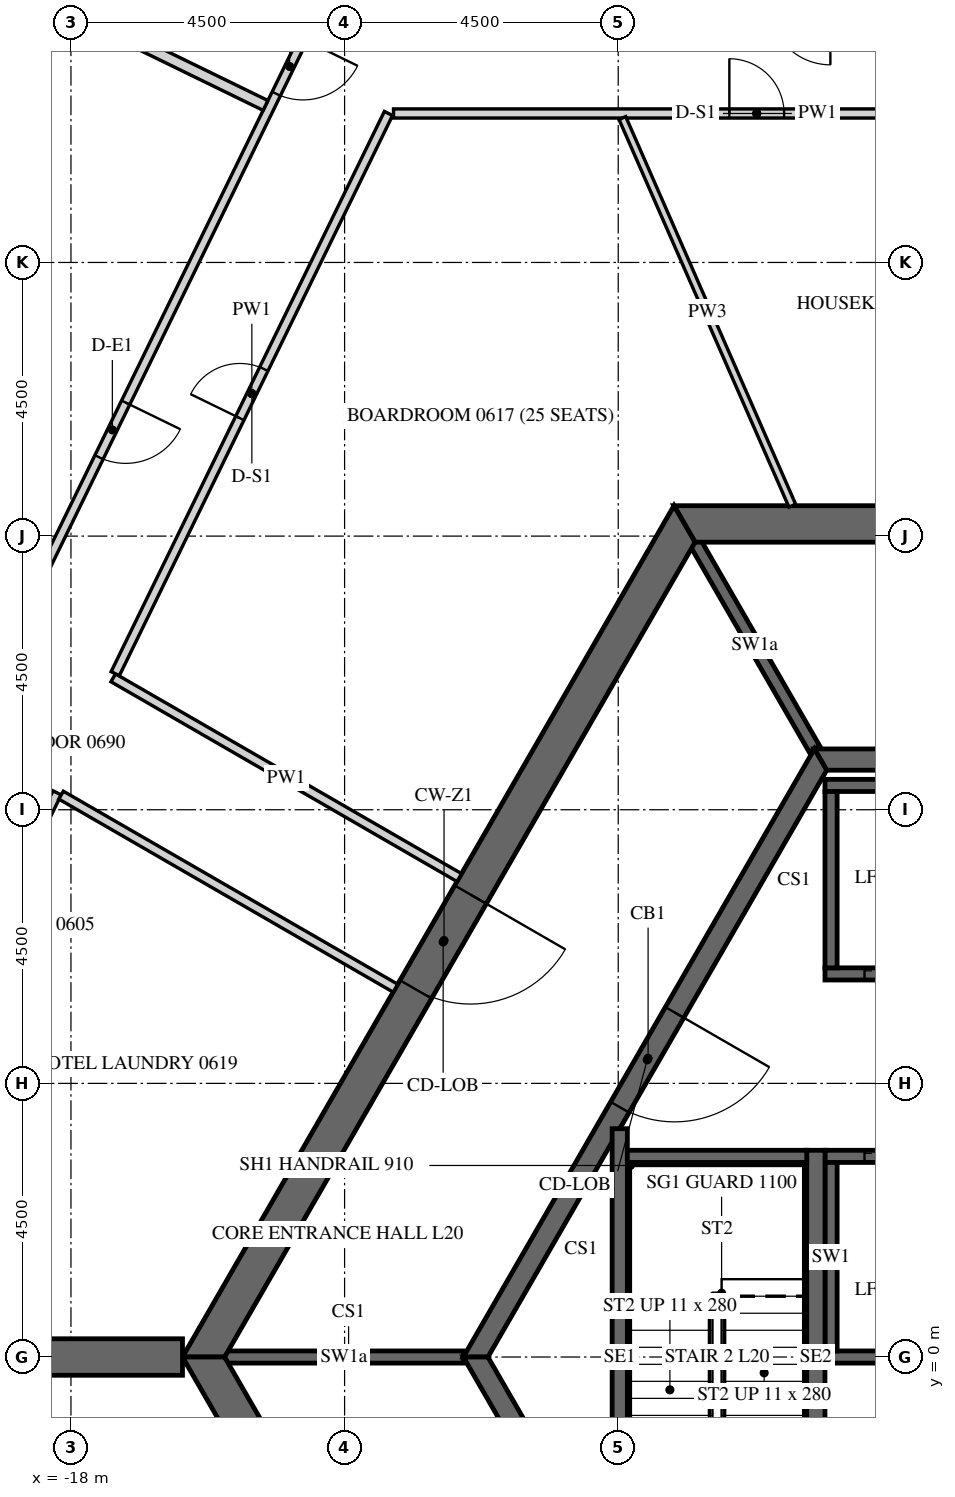
"""IFC4 building model, lengths in metres.
Left out: names, types, materials, properties, quantities, classifications, styles, units other than length and angle.
Written with IfcOpenShell. Run it as: python <this file> out.ifc"""

import sys

from ifc_helpers import new_model, si_unit, direction, frame, frame_2d, origin, place, context, subcontext, project, spatial, polyline, rectangle, outline, extrude, element, fill, save


model = new_model("IFC4")
c1 = context("Model", 3, precision=1e-05, world=origin(), true_north=direction((0.0, 1.0)))
c2 = subcontext(c1, "Body", "Model", "MODEL_VIEW")
j1 = project(units=[si_unit("LENGTHUNIT", "METRE"), si_unit("PLANEANGLEUNIT", "RADIAN")], contexts=[c1])
p1 = place(None, origin())
s1 = spatial("IfcSite", under=j1, at=p1, CompositionType="ELEMENT")
p2 = place(p1, origin())
s2 = spatial("IfcBuilding", under=s1, at=p2, CompositionType="ELEMENT")
p3 = place(p2, frame((0.0, 0.0, 92.1)))
s3 = spatial("IfcBuildingStorey", under=s2, at=p3, CompositionType="ELEMENT", Elevation=92.1)
p4 = place(p3, frame((-7.91, 13.7, -0.15), z_axis=(0.0, 0.0, 1.0), x_axis=(-0.499999880136, -0.866025472988, 0.0)))
e1 = element("IfcWall", 1, at=p4, inside=s3, PredefinedType="SHEAR", context=c2, shape_type="SweptSolid", body=[
    extrude(outline(polyline([(-0.173, -0.3), (15.993, -0.3), (15.646, 0.3), (0.173, 0.3), (-0.173, -0.3)])), origin(), (0.0, 0.0, 1.0), 3.9),
])
p5 = place(p4, frame((7.039, 0.0, 0.15)))
e2 = element("IfcOpeningElement", 2, at=p5, cuts=e1, PredefinedType="OPENING", context=c2, shape_type="SweptSolid", body=[
    extrude(rectangle(XDim=1.8, YDim=2.4, at=frame_2d((0.9, 1.2))), frame((0.0, 0.31, 0.0), z_axis=(0.0, -1.0, 0.0), x_axis=(1.0, 0.0, 0.0)), (0.0, 0.0, 1.0), 0.62),
])
p6 = place(p3, frame((-15.819, 0.0, -0.15), z_axis=(0.0, 0.0, 1.0), x_axis=(0.499999880136, -0.866025472988, 0.0)))
e3 = element("IfcWall", 3, at=p6, inside=s3, PredefinedType="SHEAR", context=c2, shape_type="SweptSolid", body=[
    extrude(outline(polyline([(-0.173, -0.3), (15.993, -0.3), (15.646, 0.3), (0.173, 0.3), (-0.173, -0.3)])), origin(), (0.0, 0.0, 1.0), 3.9),
])
p7 = place(p6, frame((6.981, 0.0, 0.15)))
e4 = element("IfcOpeningElement", 4, at=p7, cuts=e3, PredefinedType="OPENING", context=c2, shape_type="SweptSolid", body=[
    extrude(rectangle(XDim=1.8, YDim=2.4, at=frame_2d((0.9, 1.2))), frame((0.0, 0.31, 0.0), z_axis=(0.0, -1.0, 0.0), x_axis=(1.0, 0.0, 0.0)), (0.0, 0.0, 1.0), 0.62),
])
p8 = place(p3, frame((7.91, 13.7, -0.15), z_axis=(0.0, 0.0, 1.0), x_axis=(-1.0, 0.0, 0.0)))
e5 = element("IfcWall", 5, at=p8, inside=s3, PredefinedType="SHEAR", context=c2, shape_type="SweptSolid", body=[
    extrude(outline(polyline([(-0.173, -0.3), (15.993, -0.3), (15.646, 0.3), (0.173, 0.3), (-0.173, -0.3)])), origin(), (0.0, 0.0, 1.0), 3.9),
])
p9 = place(p8, frame((7.31, 0.0, 0.15)))
e6 = element("IfcOpeningElement", 6, at=p9, cuts=e5, PredefinedType="OPENING", context=c2, shape_type="SweptSolid", body=[
    extrude(rectangle(XDim=1.2, YDim=2.4, at=frame_2d((0.6, 1.2))), frame((0.0, 0.31, 0.0), z_axis=(0.0, -1.0, 0.0), x_axis=(1.0, 0.0, 0.0)), (0.0, 0.0, 1.0), 0.62),
])
p10 = place(p3, frame((-16.166, 0.0, -0.15), z_axis=(0.0, 0.0, 1.0), x_axis=(-1.0, 0.0, 0.0)))
e7 = element("IfcWall", 7, at=p10, inside=s3, PredefinedType="SHEAR", context=c2, shape_type="SweptSolid", body=[
    extrude(rectangle(XDim=16.509, YDim=0.6, at=frame_2d((8.254, 0.0))), origin(), (0.0, 0.0, 1.0), 3.9),
])
p11 = place(p10, frame((7.354, 0.0, 0.15)))
e8 = element("IfcOpeningElement", 8, at=p11, cuts=e7, PredefinedType="OPENING", context=c2, shape_type="SweptSolid", body=[
    extrude(rectangle(XDim=1.8, YDim=2.4, at=frame_2d((0.9, 1.2))), frame((0.0, 0.31, 0.0), z_axis=(0.0, -1.0, 0.0), x_axis=(1.0, 0.0, 0.0)), (0.0, 0.0, 1.0), 0.62),
])
p12 = place(p3, frame((-5.673, 9.825, -0.15), z_axis=(0.0, 0.0, 1.0), x_axis=(-0.499995046907, -0.866028263435, 0.0)))
e9 = element("IfcWall", 9, at=p12, inside=s3, PredefinedType="SHEAR", context=c2, shape_type="SweptSolid", body=[
    extrude(outline(polyline([(-0.101, -0.175), (11.446, -0.175), (11.244, 0.175), (0.101, 0.175), (-0.101, -0.175)])), origin(), (0.0, 0.0, 1.0), 3.9),
])
p13 = place(p12, frame((4.801, 0.0, 0.15)))
e10 = element("IfcOpeningElement", 10, at=p13, cuts=e9, PredefinedType="OPENING", context=c2, shape_type="SweptSolid", body=[
    extrude(rectangle(XDim=1.8, YDim=2.4, at=frame_2d((0.9, 1.2))), frame((0.0, 0.185, 0.0), z_axis=(0.0, -1.0, 0.0), x_axis=(1.0, 0.0, 0.0)), (0.0, 0.0, 1.0), 0.37),
])
p14 = place(p3, frame((-11.345, 0.0, -0.15), z_axis=(0.0, 0.0, 1.0), x_axis=(0.499995046907, -0.866028263435, 0.0)))
e11 = element("IfcWall", 11, at=p14, inside=s3, PredefinedType="SHEAR", context=c2, shape_type="SweptSolid", body=[
    extrude(outline(polyline([(-0.101, -0.175), (11.446, -0.175), (11.244, 0.175), (0.101, 0.175), (-0.101, -0.175)])), origin(), (0.0, 0.0, 1.0), 3.9),
])
p15 = place(p14, frame((4.744, 0.0, 0.15)))
e12 = element("IfcOpeningElement", 12, at=p15, cuts=e11, PredefinedType="OPENING", context=c2, shape_type="SweptSolid", body=[
    extrude(rectangle(XDim=1.8, YDim=2.4, at=frame_2d((0.9, 1.2))), frame((0.0, 0.185, 0.0), z_axis=(0.0, -1.0, 0.0), x_axis=(1.0, 0.0, 0.0)), (0.0, 0.0, 1.0), 0.37),
])
p16 = place(p3, frame((5.673, 9.825, -0.15), z_axis=(0.0, 0.0, 1.0), x_axis=(-1.0, 0.0, 0.0)))
e13 = element("IfcWall", 13, at=p16, inside=s3, PredefinedType="SHEAR", context=c2, shape_type="SweptSolid", body=[
    extrude(outline(polyline([(-0.101, -0.175), (11.446, -0.175), (11.244, 0.175), (0.101, 0.175), (-0.101, -0.175)])), origin(), (0.0, 0.0, 1.0), 3.9),
])
p17 = place(p3, frame((-5.6, 6.3, -0.25), z_axis=(0.0, 0.0, 1.0), x_axis=(1.0, 0.0, 0.0)))
e14 = element("IfcWall", 14, at=p17, inside=s3, PredefinedType="SHEAR", context=c2, shape_type="SweptSolid", body=[
    extrude(rectangle(XDim=11.2, YDim=0.2, at=frame_2d((5.6, 0.0))), origin(), (0.0, 0.0, 1.0), 3.9),
])
p18 = place(p17, frame((0.65, 0.0, 0.25)))
e15 = element("IfcOpeningElement", 15, at=p18, cuts=e14, PredefinedType="OPENING", context=c2, shape_type="SweptSolid", body=[
    extrude(rectangle(XDim=1.1, YDim=2.1, at=frame_2d((0.55, 1.05))), frame((0.0, 0.11, 0.0), z_axis=(0.0, -1.0, 0.0), x_axis=(1.0, 0.0, 0.0)), (0.0, 0.0, 1.0), 0.22),
])
p19 = place(p17, frame((2.85, 0.0, 0.25)))
e16 = element("IfcOpeningElement", 16, at=p19, cuts=e14, PredefinedType="OPENING", context=c2, shape_type="SweptSolid", body=[
    extrude(rectangle(XDim=1.1, YDim=2.1, at=frame_2d((0.55, 1.05))), frame((0.0, 0.11, 0.0), z_axis=(0.0, -1.0, 0.0), x_axis=(1.0, 0.0, 0.0)), (0.0, 0.0, 1.0), 0.22),
])
p20 = place(p17, frame((5.05, 0.0, 0.25)))
e17 = element("IfcOpeningElement", 17, at=p20, cuts=e14, PredefinedType="OPENING", context=c2, shape_type="SweptSolid", body=[
    extrude(rectangle(XDim=1.1, YDim=2.1, at=frame_2d((0.55, 1.05))), frame((0.0, 0.11, 0.0), z_axis=(0.0, -1.0, 0.0), x_axis=(1.0, 0.0, 0.0)), (0.0, 0.0, 1.0), 0.22),
])
p21 = place(p17, frame((7.25, 0.0, 0.25)))
e18 = element("IfcOpeningElement", 18, at=p21, cuts=e14, PredefinedType="OPENING", context=c2, shape_type="SweptSolid", body=[
    extrude(rectangle(XDim=1.1, YDim=2.1, at=frame_2d((0.55, 1.05))), frame((0.0, 0.11, 0.0), z_axis=(0.0, -1.0, 0.0), x_axis=(1.0, 0.0, 0.0)), (0.0, 0.0, 1.0), 0.22),
])
p22 = place(p17, frame((9.45, 0.0, 0.25)))
e19 = element("IfcOpeningElement", 19, at=p22, cuts=e14, PredefinedType="OPENING", context=c2, shape_type="SweptSolid", body=[
    extrude(rectangle(XDim=1.1, YDim=2.1, at=frame_2d((0.55, 1.05))), frame((0.0, 0.11, 0.0), z_axis=(0.0, -1.0, 0.0), x_axis=(1.0, 0.0, 0.0)), (0.0, 0.0, 1.0), 0.22),
])
p23 = place(p3, frame((-5.6, 9.4, -0.25), z_axis=(0.0, 0.0, 1.0), x_axis=(1.0, 0.0, 0.0)))
e20 = element("IfcWall", 20, at=p23, inside=s3, PredefinedType="SHEAR", context=c2, shape_type="SweptSolid", body=[
    extrude(rectangle(XDim=11.2, YDim=0.2, at=frame_2d((5.6, 0.0))), origin(), (0.0, 0.0, 1.0), 3.9),
])
p24 = place(p3, frame((-5.5, 6.4, -0.25), z_axis=(0.0, 0.0, 1.0), x_axis=(0.0, 1.0, 0.0)))
e21 = element("IfcWall", 21, at=p24, inside=s3, PredefinedType="SHEAR", context=c2, shape_type="SweptSolid", body=[
    extrude(rectangle(XDim=2.9, YDim=0.2, at=frame_2d((1.45, 0.0))), origin(), (0.0, 0.0, 1.0), 3.9),
])
p25 = place(p3, frame((-5.6, 3.3, -0.25), z_axis=(0.0, 0.0, 1.0), x_axis=(1.0, 0.0, 0.0)))
e22 = element("IfcWall", 22, at=p25, inside=s3, PredefinedType="SHEAR", context=c2, shape_type="SweptSolid", body=[
    extrude(rectangle(XDim=11.2, YDim=0.2, at=frame_2d((5.6, 0.0))), origin(), (0.0, 0.0, 1.0), 3.9),
])
p26 = place(p25, frame((0.65, 0.0, 0.25)))
e23 = element("IfcOpeningElement", 23, at=p26, cuts=e22, PredefinedType="OPENING", context=c2, shape_type="SweptSolid", body=[
    extrude(rectangle(XDim=1.1, YDim=2.1, at=frame_2d((0.55, 1.05))), frame((0.0, 0.11, 0.0), z_axis=(0.0, -1.0, 0.0), x_axis=(1.0, 0.0, 0.0)), (0.0, 0.0, 1.0), 0.22),
])
p27 = place(p25, frame((2.85, 0.0, 0.25)))
e24 = element("IfcOpeningElement", 24, at=p27, cuts=e22, PredefinedType="OPENING", context=c2, shape_type="SweptSolid", body=[
    extrude(rectangle(XDim=1.1, YDim=2.1, at=frame_2d((0.55, 1.05))), frame((0.0, 0.11, 0.0), z_axis=(0.0, -1.0, 0.0), x_axis=(1.0, 0.0, 0.0)), (0.0, 0.0, 1.0), 0.22),
])
p28 = place(p25, frame((5.05, 0.0, 0.25)))
e25 = element("IfcOpeningElement", 25, at=p28, cuts=e22, PredefinedType="OPENING", context=c2, shape_type="SweptSolid", body=[
    extrude(rectangle(XDim=1.1, YDim=2.1, at=frame_2d((0.55, 1.05))), frame((0.0, 0.11, 0.0), z_axis=(0.0, -1.0, 0.0), x_axis=(1.0, 0.0, 0.0)), (0.0, 0.0, 1.0), 0.22),
])
p29 = place(p25, frame((7.25, 0.0, 0.25)))
e26 = element("IfcOpeningElement", 26, at=p29, cuts=e22, PredefinedType="OPENING", context=c2, shape_type="SweptSolid", body=[
    extrude(rectangle(XDim=1.1, YDim=2.1, at=frame_2d((0.55, 1.05))), frame((0.0, 0.11, 0.0), z_axis=(0.0, -1.0, 0.0), x_axis=(1.0, 0.0, 0.0)), (0.0, 0.0, 1.0), 0.22),
])
p30 = place(p25, frame((9.45, 0.0, 0.25)))
e27 = element("IfcOpeningElement", 27, at=p30, cuts=e22, PredefinedType="OPENING", context=c2, shape_type="SweptSolid", body=[
    extrude(rectangle(XDim=1.1, YDim=2.1, at=frame_2d((0.55, 1.05))), frame((0.0, 0.11, 0.0), z_axis=(0.0, -1.0, 0.0), x_axis=(1.0, 0.0, 0.0)), (0.0, 0.0, 1.0), 0.22),
])
p31 = place(p3, frame((-5.6, 0.0, -0.25), z_axis=(0.0, 0.0, 1.0), x_axis=(1.0, 0.0, 0.0)))
e28 = element("IfcWall", 28, at=p31, inside=s3, PredefinedType="SHEAR", context=c2, shape_type="SweptSolid", body=[
    extrude(rectangle(XDim=11.2, YDim=0.2, at=frame_2d((5.6, 0.0))), origin(), (0.0, 0.0, 1.0), 3.9),
])
p32 = place(p3, frame((-5.5, 0.1, -0.25), z_axis=(0.0, 0.0, 1.0), x_axis=(0.0, 1.0, 0.0)))
e29 = element("IfcWall", 29, at=p32, inside=s3, PredefinedType="SHEAR", context=c2, shape_type="SweptSolid", body=[
    extrude(rectangle(XDim=3.1, YDim=0.2, at=frame_2d((1.55, 0.0))), origin(), (0.0, 0.0, 1.0), 3.9),
])
p33 = place(p3, frame((-5.773, 10.0, -0.15), z_axis=(0.0, 0.0, 1.0), x_axis=(-0.500038251005, 0.86600331843, 0.0)))
e30 = element("IfcWall", 30, at=p33, inside=s3, PredefinedType="SHEAR", context=c2, shape_type="SweptSolid", body=[
    extrude(rectangle(XDim=3.926, YDim=0.2, at=frame_2d((1.963, 0.0))), origin(), (0.0, 0.0, 1.0), 3.9),
])
p34 = place(p3, frame((-11.547, 0.0, -0.15), z_axis=(0.0, 0.0, 1.0), x_axis=(-1.0, 0.0, 0.0)))
e31 = element("IfcWall", 31, at=p34, inside=s3, PredefinedType="SHEAR", context=c2, shape_type="SweptSolid", body=[
    extrude(rectangle(XDim=3.926, YDim=0.2, at=frame_2d((1.963, 0.0))), origin(), (0.0, 0.0, 1.0), 3.9),
])
p35 = place(p3, frame((-5.75, -3.4, -0.25), z_axis=(0.0, 0.0, 1.0), x_axis=(0.0, 1.0, 0.0)))
e32 = element("IfcWall", 32, at=p35, inside=s3, PredefinedType="SHEAR", context=c2, shape_type="SweptSolid", body=[
    extrude(rectangle(XDim=6.8, YDim=0.3, at=frame_2d((3.4, 0.0))), origin(), (0.0, 0.0, 1.0), 3.9),
])
p36 = place(p3, frame((-8.975, -3.755, -0.25), z_axis=(0.0, 0.0, 1.0), x_axis=(0.0, 1.0, 0.0)))
e33 = element("IfcWall", 33, at=p36, inside=s3, PredefinedType="SHEAR", context=c2, shape_type="SweptSolid", body=[
    extrude(rectangle(XDim=7.51, YDim=0.25, at=frame_2d((3.755, 0.0))), origin(), (0.0, 0.0, 1.0), 3.9),
])
p37 = place(p3, frame((-8.85, 3.3, -0.25), z_axis=(0.0, 0.0, 1.0), x_axis=(1.0, 0.0, 0.0)))
e34 = element("IfcWall", 34, at=p37, inside=s3, PredefinedType="SHEAR", context=c2, shape_type="SweptSolid", body=[
    extrude(rectangle(XDim=2.95, YDim=0.2, at=frame_2d((1.475, 0.0))), origin(), (0.0, 0.0, 1.0), 3.9),
])
p38 = place(p3, frame((-13.94, 22.175, 0.0), z_axis=(0.0, 0.0, 1.0), x_axis=(-0.438373022655, -0.898793131376, 0.0)))
e35 = element("IfcWall", 35, at=p38, inside=s3, PredefinedType="PARTITIONING", context=c2, shape_type="SweptSolid", body=[
    extrude(rectangle(XDim=22.335, YDim=0.15, at=frame_2d((11.168, 0.0))), origin(), (0.0, 0.0, 1.0), 2.988),
])
p39 = place(p38, frame((0.559, 0.0, 0.0)))
e36 = element("IfcOpeningElement", 36, at=p39, cuts=e35, PredefinedType="OPENING", context=c2, shape_type="SweptSolid", body=[
    extrude(rectangle(XDim=1.0, YDim=2.1, at=frame_2d((0.5, 1.05))), frame((0.0, 0.085, 0.0), z_axis=(0.0, -1.0, 0.0), x_axis=(1.0, 0.0, 0.0)), (0.0, 0.0, 1.0), 0.17),
])
p40 = place(p38, frame((7.209, 0.0, 0.0)))
e37 = element("IfcOpeningElement", 37, at=p40, cuts=e35, PredefinedType="OPENING", context=c2, shape_type="SweptSolid", body=[
    extrude(rectangle(XDim=1.0, YDim=2.1, at=frame_2d((0.5, 1.05))), frame((0.0, 0.085, 0.0), z_axis=(0.0, -1.0, 0.0), x_axis=(1.0, 0.0, 0.0)), (0.0, 0.0, 1.0), 0.17),
])
p41 = place(p38, frame((20.072, 0.0, 0.0)))
e38 = element("IfcOpeningElement", 38, at=p41, cuts=e35, PredefinedType="OPENING", context=c2, shape_type="SweptSolid", body=[
    extrude(rectangle(XDim=1.0, YDim=2.1, at=frame_2d((0.5, 1.05))), frame((0.0, 0.085, 0.0), z_axis=(0.0, -1.0, 0.0), x_axis=(1.0, 0.0, 0.0)), (0.0, 0.0, 1.0), 0.17),
])
p42 = place(p3, frame((-12.695, 20.45, 0.0), z_axis=(0.0, 0.0, 1.0), x_axis=(1.0, 0.0, 0.0)))
e39 = element("IfcWall", 39, at=p42, inside=s3, PredefinedType="PARTITIONING", context=c2, shape_type="SweptSolid", body=[
    extrude(rectangle(XDim=11.945, YDim=0.15, at=frame_2d((5.973, 0.0))), origin(), (0.0, 0.0, 1.0), 2.988),
])
p43 = place(p42, frame((5.522, 0.0, 0.0)))
e40 = element("IfcOpeningElement", 40, at=p43, cuts=e39, PredefinedType="OPENING", context=c2, shape_type="SweptSolid", body=[
    extrude(rectangle(XDim=0.9, YDim=2.1, at=frame_2d((0.45, 1.05))), frame((0.0, 0.085, 0.0), z_axis=(0.0, -1.0, 0.0), x_axis=(1.0, 0.0, 0.0)), (0.0, 0.0, 1.0), 0.17),
])
p44 = place(p3, frame((-11.614, 7.884, 0.0), z_axis=(0.0, 0.0, 1.0), x_axis=(-0.866025963225, 0.49999903102, 0.0)))
e41 = element("IfcWall", 41, at=p44, inside=s3, PredefinedType="PARTITIONING", context=c2, shape_type="SweptSolid", body=[
    extrude(rectangle(XDim=6.571, YDim=0.15, at=frame_2d((3.286, 0.0))), origin(), (0.0, 0.0, 1.0), 2.988),
])
p45 = place(p3, frame((-17.272, 11.238, 0.0), z_axis=(0.0, 0.0, 1.0), x_axis=(0.438369193793, 0.898794998836, 0.0)))
e42 = element("IfcWall", 42, at=p45, inside=s3, PredefinedType="PARTITIONING", context=c2, shape_type="SweptSolid", body=[
    extrude(rectangle(XDim=10.25, YDim=0.15, at=frame_2d((5.125, 0.0))), origin(), (0.0, 0.0, 1.0), 2.988),
])
p46 = place(p45, frame((4.675, 0.0, 0.0)))
e43 = element("IfcOpeningElement", 43, at=p46, cuts=e42, PredefinedType="OPENING", context=c2, shape_type="SweptSolid", body=[
    extrude(rectangle(XDim=0.9, YDim=2.1, at=frame_2d((0.45, 1.05))), frame((0.0, 0.085, 0.0), z_axis=(0.0, -1.0, 0.0), x_axis=(1.0, 0.0, 0.0)), (0.0, 0.0, 1.0), 0.17),
])
p47 = place(p3, frame((-22.553, 0.41, 0.0), z_axis=(0.0, 0.0, 1.0), x_axis=(0.438382679221, 0.898788421465, 0.0)))
e44 = element("IfcWall", 44, at=p47, inside=s3, PredefinedType="PARTITIONING", context=c2, shape_type="SweptSolid", body=[
    extrude(rectangle(XDim=9.866, YDim=0.15, at=frame_2d((4.933, 0.0))), origin(), (0.0, 0.0, 1.0), 2.988),
])
p48 = place(p47, frame((4.483, 0.0, 0.0)))
e45 = element("IfcOpeningElement", 45, at=p48, cuts=e44, PredefinedType="OPENING", context=c2, shape_type="SweptSolid", body=[
    extrude(rectangle(XDim=0.9, YDim=2.1, at=frame_2d((0.45, 1.05))), frame((0.0, 0.085, 0.0), z_axis=(0.0, -1.0, 0.0), x_axis=(1.0, 0.0, 0.0)), (0.0, 0.0, 1.0), 0.17),
])
p49 = place(p3, frame((-18.162, 9.24, 0.0), z_axis=(0.0, 0.0, 1.0), x_axis=(0.866026781814, -0.499997613175, 0.0)))
e46 = element("IfcWall", 46, at=p49, inside=s3, PredefinedType="PARTITIONING", context=c2, shape_type="SweptSolid", body=[
    extrude(rectangle(XDim=6.349, YDim=0.15, at=frame_2d((3.175, 0.0))), origin(), (0.0, 0.0, 1.0), 2.988),
])
p50 = place(p3, frame((-21.204, 23.706, 0.0), z_axis=(0.0, 0.0, 1.0), x_axis=(0.898783593711, -0.438392577123, 0.0)))
e47 = element("IfcWall", 47, at=p50, inside=s3, PredefinedType="PARTITIONING", context=c2, shape_type="SweptSolid", body=[
    extrude(rectangle(XDim=7.125, YDim=0.18, at=frame_2d((3.562, 0.0))), origin(), (0.0, 0.0, 1.0), 2.988),
])
p51 = place(p3, frame((-8.932, 20.375, 0.0), z_axis=(0.0, 0.0, 1.0), x_axis=(0.401495831576, -0.915860850363, 0.0)))
e48 = element("IfcWall", 48, at=p51, inside=s3, PredefinedType="PARTITIONING", context=c2, shape_type="SweptSolid", body=[
    extrude(rectangle(XDim=6.961, YDim=0.12, at=frame_2d((3.48, 0.0))), origin(), (0.0, 0.0, 1.0), 2.988),
])
p52 = place(p5, origin())
e49 = element("IfcDoor", 49, at=p52, inside=s3, OperationType="DOUBLE_DOOR_SINGLE_SWING", PredefinedType="DOOR", context=c2, shape_type="SweptSolid", body=[
    extrude(rectangle(XDim=1.8, YDim=2.4, at=frame_2d((0.9, 1.2))), frame((0.0, 0.025, 0.0), z_axis=(0.0, -1.0, 0.0), x_axis=(1.0, 0.0, 0.0)), (0.0, 0.0, 1.0), 0.05),
])
fill(e2, e49)
p53 = place(p13, origin())
e50 = element("IfcDoor", 50, at=p53, inside=s3, OperationType="DOUBLE_DOOR_SINGLE_SWING", PredefinedType="DOOR", context=c2, shape_type="SweptSolid", body=[
    extrude(rectangle(XDim=1.8, YDim=2.4, at=frame_2d((0.9, 1.2))), frame((0.0, 0.025, 0.0), z_axis=(0.0, -1.0, 0.0), x_axis=(1.0, 0.0, 0.0)), (0.0, 0.0, 1.0), 0.05),
])
fill(e10, e50)
p54 = place(p18, origin())
e51 = element("IfcDoor", 51, at=p54, inside=s3, OperationType="SLIDING_TO_LEFT", PredefinedType="DOOR", context=c2, shape_type="SweptSolid", body=[
    extrude(rectangle(XDim=1.1, YDim=2.1, at=frame_2d((0.55, 1.05))), frame((0.0, 0.025, 0.0), z_axis=(0.0, -1.0, 0.0), x_axis=(1.0, 0.0, 0.0)), (0.0, 0.0, 1.0), 0.05),
])
fill(e15, e51)
p55 = place(p26, origin())
e52 = element("IfcDoor", 52, at=p55, inside=s3, OperationType="SLIDING_TO_LEFT", PredefinedType="DOOR", context=c2, shape_type="SweptSolid", body=[
    extrude(rectangle(XDim=1.1, YDim=2.1, at=frame_2d((0.55, 1.05))), frame((0.0, 0.025, 0.0), z_axis=(0.0, -1.0, 0.0), x_axis=(1.0, 0.0, 0.0)), (0.0, 0.0, 1.0), 0.05),
])
fill(e23, e52)
p56 = place(p39, origin())
e53 = element("IfcDoor", 53, at=p56, inside=s3, OperationType="SINGLE_SWING_LEFT", PredefinedType="DOOR", context=c2, shape_type="SweptSolid", body=[
    extrude(rectangle(XDim=1.0, YDim=2.1, at=frame_2d((0.5, 1.05))), frame((0.0, 0.025, 0.0), z_axis=(0.0, -1.0, 0.0), x_axis=(1.0, 0.0, 0.0)), (0.0, 0.0, 1.0), 0.05),
])
fill(e36, e53)
p57 = place(p40, origin())
e54 = element("IfcDoor", 54, at=p57, inside=s3, OperationType="SINGLE_SWING_LEFT", PredefinedType="DOOR", context=c2, shape_type="SweptSolid", body=[
    extrude(rectangle(XDim=1.0, YDim=2.1, at=frame_2d((0.5, 1.05))), frame((0.0, 0.025, 0.0), z_axis=(0.0, -1.0, 0.0), x_axis=(1.0, 0.0, 0.0)), (0.0, 0.0, 1.0), 0.05),
])
fill(e37, e54)
p58 = place(p43, origin())
e55 = element("IfcDoor", 55, at=p58, inside=s3, OperationType="SINGLE_SWING_RIGHT", PredefinedType="DOOR", context=c2, shape_type="SweptSolid", body=[
    extrude(rectangle(XDim=0.9, YDim=2.1, at=frame_2d((0.45, 1.05))), frame((0.0, 0.025, 0.0), z_axis=(0.0, -1.0, 0.0), x_axis=(1.0, 0.0, 0.0)), (0.0, 0.0, 1.0), 0.05),
])
fill(e40, e55)
p59 = place(p46, origin())
e56 = element("IfcDoor", 56, at=p59, inside=s3, OperationType="SINGLE_SWING_LEFT", PredefinedType="DOOR", context=c2, shape_type="SweptSolid", body=[
    extrude(rectangle(XDim=0.9, YDim=2.1, at=frame_2d((0.45, 1.05))), frame((0.0, 0.025, 0.0), z_axis=(0.0, -1.0, 0.0), x_axis=(1.0, 0.0, 0.0)), (0.0, 0.0, 1.0), 0.05),
])
fill(e43, e56)
save(model, sys.argv[1])
